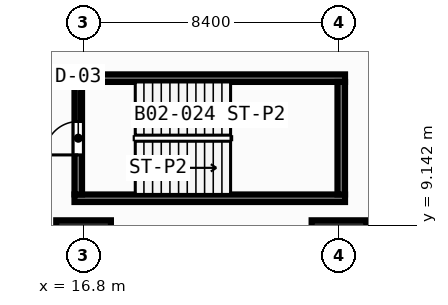
"""IFC4 building model, lengths in metres.
Left out: names, types, materials, properties, quantities, classifications, styles, units other than length and angle.
Written with IfcOpenShell. Run it as: python <this file> out.ifc"""

import sys

from ifc_helpers import new_model, si_unit, direction, frame, frame_2d, origin, origin_2d, place, context, subcontext, project, spatial, rectangle, extrude, element, fill, save


model = new_model("IFC4")
c1 = context("Model", 3, precision=1e-05, world=origin(), true_north=direction((0.0, 1.0)))
c2 = subcontext(c1, "Body", "Model", "MODEL_VIEW")
j1 = project(units=[si_unit("LENGTHUNIT", "METRE"), si_unit("PLANEANGLEUNIT", "RADIAN")], contexts=[c1])
p1 = place(None, origin())
s1 = spatial("IfcSite", under=j1, at=p1, CompositionType="ELEMENT")
p2 = place(p1, origin())
s2 = spatial("IfcBuilding", under=s1, at=p2, CompositionType="ELEMENT")
p3 = place(p2, frame((0.0, 0.0, -8.4)))
s3 = spatial("IfcBuildingStorey", under=s2, at=p3, CompositionType="ELEMENT", Elevation=-8.4)
for number, where, z_axis, x_axis in (
    (1, (16.5, 10.025, 0.0), (0.0, 0.0, 1.0), (1.0, 0.0, 0.0)),
    (2, (16.5, 13.975, 0.0), (0.0, 0.0, 1.0), (1.0, 0.0, 0.0)),
):
    element("IfcWall", number, at=place(p3, frame(where, z_axis=z_axis, x_axis=x_axis)), inside=s3, PredefinedType="SOLIDWALL", context=c2, shape_type="SweptSolid", body=[
        extrude(rectangle(XDim=8.9, YDim=0.25, at=frame_2d((4.45, 0.0))), origin(), (0.0, 0.0, 1.0), 3.85),
    ])
p4 = place(p3, frame((25.275, 10.15, 0.0), z_axis=(0.0, 0.0, 1.0), x_axis=(0.0, 1.0, 0.0)))
e3 = element("IfcWall", 3, at=p4, inside=s3, PredefinedType="SOLIDWALL", context=c2, shape_type="SweptSolid", body=[
    extrude(rectangle(XDim=3.7, YDim=0.25, at=frame_2d((1.85, 0.0))), origin(), (0.0, 0.0, 1.0), 3.85),
])
for number, where, z_axis, x_axis in (
    (4, (16.8, 8.4, 0.0), (0.0, 0.0, 1.0), (1.0, 0.0, 0.0)),
    (5, (25.2, 8.4, 0.0), (0.0, 0.0, 1.0), (1.0, 0.0, 0.0)),
):
    element("IfcColumn", number, at=place(p3, frame(where, z_axis=z_axis, x_axis=x_axis)), inside=s3, PredefinedType="COLUMN", context=c2, shape_type="SweptSolid", body=[
        extrude(rectangle(XDim=1.8, YDim=1.8, at=origin_2d()), origin(), (0.0, 0.0, 1.0), 4.2),
    ])
p5 = place(p3, frame((16.625, 10.15, 0.0), z_axis=(0.0, 0.0, 1.0), x_axis=(0.0, 1.0, 0.0)))
e6 = element("IfcWall", 6, at=p5, inside=s3, PredefinedType="SOLIDWALL", context=c2, shape_type="SweptSolid", body=[
    extrude(rectangle(XDim=3.7, YDim=0.25, at=frame_2d((1.85, 0.0))), origin(), (0.0, 0.0, 1.0), 3.85),
])
p6 = place(p5, frame((1.3, 0.0, 0.0)))
e7 = element("IfcOpeningElement", 7, at=p6, cuts=e6, PredefinedType="OPENING", context=c2, shape_type="SweptSolid", body=[
    extrude(rectangle(XDim=1.1, YDim=2.15, at=frame_2d((0.55, 1.075))), frame((0.0, 0.135, 0.0), z_axis=(0.0, -1.0, 0.0), x_axis=(1.0, 0.0, 0.0)), (0.0, 0.0, 1.0), 0.27),
])
p7 = place(p6, origin())
e8 = element("IfcDoor", 8, at=p7, inside=s3, OperationType="SINGLE_SWING_LEFT", PredefinedType="DOOR", context=c2, shape_type="SweptSolid", body=[
    extrude(rectangle(XDim=1.1, YDim=2.15, at=frame_2d((0.55, 1.075))), frame((0.0, 0.025, 0.0), z_axis=(0.0, -1.0, 0.0), x_axis=(1.0, 0.0, 0.0)), (0.0, 0.0, 1.0), 0.05),
])
fill(e7, e8)
save(model, sys.argv[1])
